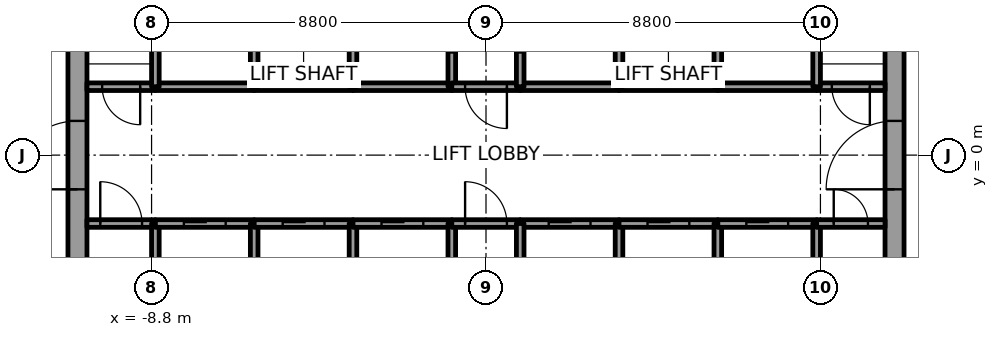
"""IFC4 building model, lengths in metres.
Left out: names, types, materials, properties, quantities, classifications, styles, units other than length and angle.
Written with IfcOpenShell. Run it as: python <this file> out.ifc"""

import sys

from ifc_helpers import new_model, si_unit, direction, frame, frame_2d, origin, place, context, subcontext, project, spatial, rectangle, extrude, element, fill, save


model = new_model("IFC4")
c1 = context("Model", 3, precision=1e-05, world=origin(), true_north=direction((0.0, 1.0)))
c2 = subcontext(c1, "Body", "Model", "MODEL_VIEW")
j1 = project(units=[si_unit("LENGTHUNIT", "METRE"), si_unit("PLANEANGLEUNIT", "RADIAN")], contexts=[c1])
p1 = place(None, origin())
s1 = spatial("IfcSite", under=j1, at=p1, CompositionType="ELEMENT")
p2 = place(p1, origin())
s2 = spatial("IfcBuilding", under=s1, at=p2, CompositionType="ELEMENT")
p3 = place(p2, frame((0.0, 0.0, 149.8)))
s3 = spatial("IfcBuildingStorey", under=s2, at=p3, CompositionType="ELEMENT", Elevation=149.8)
p4 = place(p3, frame((-10.75, -7.5, 0.0), z_axis=(0.0, 0.0, 1.0), x_axis=(0.0, 1.0, 0.0)))
e1 = element("IfcWall", 1, at=p4, inside=s3, PredefinedType="SHEAR", context=c2, shape_type="SweptSolid", body=[
    extrude(rectangle(XDim=15.0, YDim=0.5, at=frame_2d((7.5, 0.0))), origin(), (0.0, 0.0, 1.0), 4.0),
])
p5 = place(p4, frame((6.6, 0.0, 0.0)))
e2 = element("IfcOpeningElement", 2, at=p5, cuts=e1, PredefinedType="OPENING", context=c2, shape_type="SweptSolid", body=[
    extrude(rectangle(XDim=1.8, YDim=2.1, at=frame_2d((0.9, 1.05))), frame((0.0, 0.25, 0.0), z_axis=(0.0, -1.0, 0.0), x_axis=(1.0, 0.0, 0.0)), (0.0, 0.0, 1.0), 0.5),
])
p6 = place(p3, frame((10.75, -7.5, 0.0), z_axis=(0.0, 0.0, 1.0), x_axis=(0.0, 1.0, 0.0)))
e3 = element("IfcWall", 3, at=p6, inside=s3, PredefinedType="SHEAR", context=c2, shape_type="SweptSolid", body=[
    extrude(rectangle(XDim=15.0, YDim=0.5, at=frame_2d((7.5, 0.0))), origin(), (0.0, 0.0, 1.0), 4.0),
])
p7 = place(p6, frame((6.6, 0.0, 0.0)))
e4 = element("IfcOpeningElement", 4, at=p7, cuts=e3, PredefinedType="OPENING", context=c2, shape_type="SweptSolid", body=[
    extrude(rectangle(XDim=1.8, YDim=2.1, at=frame_2d((0.9, 1.05))), frame((0.0, 0.25, 0.0), z_axis=(0.0, -1.0, 0.0), x_axis=(1.0, 0.0, 0.0)), (0.0, 0.0, 1.0), 0.5),
])
p8 = place(p3, frame((-10.5, -1.8, 0.0), z_axis=(0.0, 0.0, 1.0), x_axis=(1.0, 0.0, 0.0)))
e5 = element("IfcWall", 5, at=p8, inside=s3, PredefinedType="SOLIDWALL", context=c2, shape_type="SweptSolid", body=[
    extrude(rectangle(XDim=1.8, YDim=0.2, at=frame_2d((0.9, 0.0))), origin(), (0.0, 0.0, 1.0), 3.85),
])
p9 = place(p8, frame((0.35, 0.0, 0.0)))
e6 = element("IfcOpeningElement", 6, at=p9, cuts=e5, PredefinedType="OPENING", context=c2, shape_type="SweptSolid", body=[
    extrude(rectangle(XDim=1.1, YDim=2.1, at=frame_2d((0.55, 1.05))), frame((0.0, 0.1, 0.0), z_axis=(0.0, -1.0, 0.0), x_axis=(1.0, 0.0, 0.0)), (0.0, 0.0, 1.0), 0.2),
])
p10 = place(p3, frame((-8.7, 1.8, 0.0), z_axis=(0.0, 0.0, 1.0), x_axis=(-1.0, 0.0, 0.0)))
e7 = element("IfcWall", 7, at=p10, inside=s3, PredefinedType="SOLIDWALL", context=c2, shape_type="SweptSolid", body=[
    extrude(rectangle(XDim=1.8, YDim=0.2, at=frame_2d((0.9, 0.0))), origin(), (0.0, 0.0, 1.0), 3.85),
])
p11 = place(p10, frame((0.4, 0.0, 0.0)))
e8 = element("IfcOpeningElement", 8, at=p11, cuts=e7, PredefinedType="OPENING", context=c2, shape_type="SweptSolid", body=[
    extrude(rectangle(XDim=1.0, YDim=2.1, at=frame_2d((0.5, 1.05))), frame((0.0, 0.1, 0.0), z_axis=(0.0, -1.0, 0.0), x_axis=(1.0, 0.0, 0.0)), (0.0, 0.0, 1.0), 0.2),
])
p12 = place(p3, frame((-8.7, -4.6, 0.0), z_axis=(0.0, 0.0, 1.0), x_axis=(0.0, 1.0, 0.0)))
e9 = element("IfcWall", 9, at=p12, inside=s3, PredefinedType="SOLIDWALL", context=c2, shape_type="SweptSolid", body=[
    extrude(rectangle(XDim=2.8, YDim=0.2, at=frame_2d((1.4, 0.0))), origin(), (0.0, 0.0, 1.0), 3.85),
])
p13 = place(p3, frame((-8.7, -1.8, 0.0), z_axis=(0.0, 0.0, 1.0), x_axis=(1.0, 0.0, 0.0)))
e10 = element("IfcWall", 10, at=p13, inside=s3, PredefinedType="SOLIDWALL", context=c2, shape_type="SweptSolid", body=[
    extrude(rectangle(XDim=2.6, YDim=0.2, at=frame_2d((1.3, 0.0))), origin(), (0.0, 0.0, 1.0), 3.85),
])
p14 = place(p13, frame((0.75, 0.0, 0.0)))
e11 = element("IfcOpeningElement", 11, at=p14, cuts=e10, PredefinedType="OPENING", context=c2, shape_type="SweptSolid", body=[
    extrude(rectangle(XDim=1.1, YDim=2.1, at=frame_2d((0.55, 1.05))), frame((0.0, 0.1, 0.0), z_axis=(0.0, -1.0, 0.0), x_axis=(1.0, 0.0, 0.0)), (0.0, 0.0, 1.0), 0.2),
])
p15 = place(p3, frame((-6.1, 1.8, 0.0), z_axis=(0.0, 0.0, 1.0), x_axis=(-1.0, 0.0, 0.0)))
e12 = element("IfcWall", 12, at=p15, inside=s3, PredefinedType="SOLIDWALL", context=c2, shape_type="SweptSolid", body=[
    extrude(rectangle(XDim=2.6, YDim=0.2, at=frame_2d((1.3, 0.0))), origin(), (0.0, 0.0, 1.0), 3.85),
])
for number, where, z_axis, x_axis in (
    (13, (-8.7, 1.8, 0.0), (0.0, 0.0, 1.0), (0.0, 1.0, 0.0)),
    (14, (-6.1, -4.6, 0.0), (0.0, 0.0, 1.0), (0.0, 1.0, 0.0)),
):
    element("IfcWall", number, at=place(p3, frame(where, z_axis=z_axis, x_axis=x_axis)), inside=s3, PredefinedType="SOLIDWALL", context=c2, shape_type="SweptSolid", body=[
        extrude(rectangle(XDim=2.8, YDim=0.2, at=frame_2d((1.4, 0.0))), origin(), (0.0, 0.0, 1.0), 3.85),
    ])
p16 = place(p3, frame((-6.1, -1.8, 0.0), z_axis=(0.0, 0.0, 1.0), x_axis=(1.0, 0.0, 0.0)))
e15 = element("IfcWall", 15, at=p16, inside=s3, PredefinedType="SOLIDWALL", context=c2, shape_type="SweptSolid", body=[
    extrude(rectangle(XDim=2.6, YDim=0.2, at=frame_2d((1.3, 0.0))), origin(), (0.0, 0.0, 1.0), 3.85),
])
p17 = place(p16, frame((0.75, 0.0, 0.0)))
e16 = element("IfcOpeningElement", 16, at=p17, cuts=e15, PredefinedType="OPENING", context=c2, shape_type="SweptSolid", body=[
    extrude(rectangle(XDim=1.1, YDim=2.1, at=frame_2d((0.55, 1.05))), frame((0.0, 0.1, 0.0), z_axis=(0.0, -1.0, 0.0), x_axis=(1.0, 0.0, 0.0)), (0.0, 0.0, 1.0), 0.2),
])
p18 = place(p3, frame((-3.5, 1.8, 0.0), z_axis=(0.0, 0.0, 1.0), x_axis=(-1.0, 0.0, 0.0)))
e17 = element("IfcWall", 17, at=p18, inside=s3, PredefinedType="SOLIDWALL", context=c2, shape_type="SweptSolid", body=[
    extrude(rectangle(XDim=2.6, YDim=0.2, at=frame_2d((1.3, 0.0))), origin(), (0.0, 0.0, 1.0), 3.85),
])
for number, where, z_axis, x_axis in (
    (18, (-6.1, 1.8, 0.0), (0.0, 0.0, 1.0), (0.0, 1.0, 0.0)),
    (19, (-3.5, -4.6, 0.0), (0.0, 0.0, 1.0), (0.0, 1.0, 0.0)),
):
    element("IfcWall", number, at=place(p3, frame(where, z_axis=z_axis, x_axis=x_axis)), inside=s3, PredefinedType="SOLIDWALL", context=c2, shape_type="SweptSolid", body=[
        extrude(rectangle(XDim=2.8, YDim=0.2, at=frame_2d((1.4, 0.0))), origin(), (0.0, 0.0, 1.0), 3.85),
    ])
p19 = place(p3, frame((-3.5, -1.8, 0.0), z_axis=(0.0, 0.0, 1.0), x_axis=(1.0, 0.0, 0.0)))
e20 = element("IfcWall", 20, at=p19, inside=s3, PredefinedType="SOLIDWALL", context=c2, shape_type="SweptSolid", body=[
    extrude(rectangle(XDim=2.6, YDim=0.2, at=frame_2d((1.3, 0.0))), origin(), (0.0, 0.0, 1.0), 3.85),
])
p20 = place(p19, frame((0.75, 0.0, 0.0)))
e21 = element("IfcOpeningElement", 21, at=p20, cuts=e20, PredefinedType="OPENING", context=c2, shape_type="SweptSolid", body=[
    extrude(rectangle(XDim=1.1, YDim=2.1, at=frame_2d((0.55, 1.05))), frame((0.0, 0.1, 0.0), z_axis=(0.0, -1.0, 0.0), x_axis=(1.0, 0.0, 0.0)), (0.0, 0.0, 1.0), 0.2),
])
p21 = place(p3, frame((-0.9, 1.8, 0.0), z_axis=(0.0, 0.0, 1.0), x_axis=(-1.0, 0.0, 0.0)))
e22 = element("IfcWall", 22, at=p21, inside=s3, PredefinedType="SOLIDWALL", context=c2, shape_type="SweptSolid", body=[
    extrude(rectangle(XDim=2.6, YDim=0.2, at=frame_2d((1.3, 0.0))), origin(), (0.0, 0.0, 1.0), 3.85),
])
p22 = place(p3, frame((-3.5, 4.6, 0.0), z_axis=(0.0, 0.0, 1.0), x_axis=(0.0, -1.0, 0.0)))
e23 = element("IfcWall", 23, at=p22, inside=s3, PredefinedType="SOLIDWALL", context=c2, shape_type="SweptSolid", body=[
    extrude(rectangle(XDim=2.8, YDim=0.2, at=frame_2d((1.4, 0.0))), origin(), (0.0, 0.0, 1.0), 3.85),
])
p23 = place(p3, frame((-0.9, 1.8, 0.0), z_axis=(0.0, 0.0, 1.0), x_axis=(0.0, 1.0, 0.0)))
e24 = element("IfcWall", 24, at=p23, inside=s3, PredefinedType="SOLIDWALL", context=c2, shape_type="SweptSolid", body=[
    extrude(rectangle(XDim=3.0, YDim=0.2, at=frame_2d((1.5, 0.0))), origin(), (0.0, 0.0, 1.0), 3.85),
])
p24 = place(p23, frame((0.9, 0.0, 0.0)))
e25 = element("IfcOpeningElement", 25, at=p24, cuts=e24, PredefinedType="OPENING", context=c2, shape_type="SweptSolid", body=[
    extrude(rectangle(XDim=1.2, YDim=2.1, at=frame_2d((0.6, 1.05))), frame((0.0, 0.1, 0.0), z_axis=(0.0, -1.0, 0.0), x_axis=(1.0, 0.0, 0.0)), (0.0, 0.0, 1.0), 0.2),
])
p25 = place(p3, frame((-0.9, -4.6, 0.0), z_axis=(0.0, 0.0, 1.0), x_axis=(0.0, 1.0, 0.0)))
e26 = element("IfcWall", 26, at=p25, inside=s3, PredefinedType="SOLIDWALL", context=c2, shape_type="SweptSolid", body=[
    extrude(rectangle(XDim=2.8, YDim=0.2, at=frame_2d((1.4, 0.0))), origin(), (0.0, 0.0, 1.0), 3.85),
])
p26 = place(p3, frame((-0.9, -1.8, 0.0), z_axis=(0.0, 0.0, 1.0), x_axis=(1.0, 0.0, 0.0)))
e27 = element("IfcWall", 27, at=p26, inside=s3, PredefinedType="SOLIDWALL", context=c2, shape_type="SweptSolid", body=[
    extrude(rectangle(XDim=1.8, YDim=0.2, at=frame_2d((0.9, 0.0))), origin(), (0.0, 0.0, 1.0), 3.85),
])
p27 = place(p26, frame((0.35, 0.0, 0.0)))
e28 = element("IfcOpeningElement", 28, at=p27, cuts=e27, PredefinedType="OPENING", context=c2, shape_type="SweptSolid", body=[
    extrude(rectangle(XDim=1.1, YDim=2.1, at=frame_2d((0.55, 1.05))), frame((0.0, 0.1, 0.0), z_axis=(0.0, -1.0, 0.0), x_axis=(1.0, 0.0, 0.0)), (0.0, 0.0, 1.0), 0.2),
])
p28 = place(p3, frame((0.9, 1.8, 0.0), z_axis=(0.0, 0.0, 1.0), x_axis=(-1.0, 0.0, 0.0)))
e29 = element("IfcWall", 29, at=p28, inside=s3, PredefinedType="SOLIDWALL", context=c2, shape_type="SweptSolid", body=[
    extrude(rectangle(XDim=1.8, YDim=0.2, at=frame_2d((0.9, 0.0))), origin(), (0.0, 0.0, 1.0), 3.85),
])
p29 = place(p28, frame((0.35, 0.0, 0.0)))
e30 = element("IfcOpeningElement", 30, at=p29, cuts=e29, PredefinedType="OPENING", context=c2, shape_type="SweptSolid", body=[
    extrude(rectangle(XDim=1.1, YDim=2.1, at=frame_2d((0.55, 1.05))), frame((0.0, 0.1, 0.0), z_axis=(0.0, -1.0, 0.0), x_axis=(1.0, 0.0, 0.0)), (0.0, 0.0, 1.0), 0.2),
])
p30 = place(p3, frame((0.9, -1.8, 0.0), z_axis=(0.0, 0.0, 1.0), x_axis=(1.0, 0.0, 0.0)))
e31 = element("IfcWall", 31, at=p30, inside=s3, PredefinedType="SOLIDWALL", context=c2, shape_type="SweptSolid", body=[
    extrude(rectangle(XDim=2.6, YDim=0.2, at=frame_2d((1.3, 0.0))), origin(), (0.0, 0.0, 1.0), 3.85),
])
p31 = place(p30, frame((0.75, 0.0, 0.0)))
e32 = element("IfcOpeningElement", 32, at=p31, cuts=e31, PredefinedType="OPENING", context=c2, shape_type="SweptSolid", body=[
    extrude(rectangle(XDim=1.1, YDim=2.1, at=frame_2d((0.55, 1.05))), frame((0.0, 0.1, 0.0), z_axis=(0.0, -1.0, 0.0), x_axis=(1.0, 0.0, 0.0)), (0.0, 0.0, 1.0), 0.2),
])
p32 = place(p3, frame((0.9, -1.8, 0.0), z_axis=(0.0, 0.0, 1.0), x_axis=(0.0, -1.0, 0.0)))
e33 = element("IfcWall", 33, at=p32, inside=s3, PredefinedType="SOLIDWALL", context=c2, shape_type="SweptSolid", body=[
    extrude(rectangle(XDim=2.8, YDim=0.2, at=frame_2d((1.4, 0.0))), origin(), (0.0, 0.0, 1.0), 3.85),
])
p33 = place(p3, frame((3.5, 1.8, 0.0), z_axis=(0.0, 0.0, 1.0), x_axis=(-1.0, 0.0, 0.0)))
e34 = element("IfcWall", 34, at=p33, inside=s3, PredefinedType="SOLIDWALL", context=c2, shape_type="SweptSolid", body=[
    extrude(rectangle(XDim=2.6, YDim=0.2, at=frame_2d((1.3, 0.0))), origin(), (0.0, 0.0, 1.0), 3.85),
])
p34 = place(p3, frame((0.9, 4.8, 0.0), z_axis=(0.0, 0.0, 1.0), x_axis=(0.0, -1.0, 0.0)))
e35 = element("IfcWall", 35, at=p34, inside=s3, PredefinedType="SOLIDWALL", context=c2, shape_type="SweptSolid", body=[
    extrude(rectangle(XDim=3.0, YDim=0.2, at=frame_2d((1.5, 0.0))), origin(), (0.0, 0.0, 1.0), 3.85),
])
p35 = place(p34, frame((0.9, 0.0, 0.0)))
e36 = element("IfcOpeningElement", 36, at=p35, cuts=e35, PredefinedType="OPENING", context=c2, shape_type="SweptSolid", body=[
    extrude(rectangle(XDim=1.2, YDim=2.1, at=frame_2d((0.6, 1.05))), frame((0.0, 0.1, 0.0), z_axis=(0.0, -1.0, 0.0), x_axis=(1.0, 0.0, 0.0)), (0.0, 0.0, 1.0), 0.2),
])
p36 = place(p3, frame((3.5, -4.6, 0.0), z_axis=(0.0, 0.0, 1.0), x_axis=(0.0, 1.0, 0.0)))
e37 = element("IfcWall", 37, at=p36, inside=s3, PredefinedType="SOLIDWALL", context=c2, shape_type="SweptSolid", body=[
    extrude(rectangle(XDim=2.8, YDim=0.2, at=frame_2d((1.4, 0.0))), origin(), (0.0, 0.0, 1.0), 3.85),
])
p37 = place(p3, frame((3.5, -1.8, 0.0), z_axis=(0.0, 0.0, 1.0), x_axis=(1.0, 0.0, 0.0)))
e38 = element("IfcWall", 38, at=p37, inside=s3, PredefinedType="SOLIDWALL", context=c2, shape_type="SweptSolid", body=[
    extrude(rectangle(XDim=2.6, YDim=0.2, at=frame_2d((1.3, 0.0))), origin(), (0.0, 0.0, 1.0), 3.85),
])
p38 = place(p37, frame((0.75, 0.0, 0.0)))
e39 = element("IfcOpeningElement", 39, at=p38, cuts=e38, PredefinedType="OPENING", context=c2, shape_type="SweptSolid", body=[
    extrude(rectangle(XDim=1.1, YDim=2.1, at=frame_2d((0.55, 1.05))), frame((0.0, 0.1, 0.0), z_axis=(0.0, -1.0, 0.0), x_axis=(1.0, 0.0, 0.0)), (0.0, 0.0, 1.0), 0.2),
])
p39 = place(p3, frame((6.1, 1.8, 0.0), z_axis=(0.0, 0.0, 1.0), x_axis=(-1.0, 0.0, 0.0)))
e40 = element("IfcWall", 40, at=p39, inside=s3, PredefinedType="SOLIDWALL", context=c2, shape_type="SweptSolid", body=[
    extrude(rectangle(XDim=2.6, YDim=0.2, at=frame_2d((1.3, 0.0))), origin(), (0.0, 0.0, 1.0), 3.85),
])
for number, where, z_axis, x_axis in (
    (41, (3.5, 1.8, 0.0), (0.0, 0.0, 1.0), (0.0, 1.0, 0.0)),
    (42, (6.1, -4.6, 0.0), (0.0, 0.0, 1.0), (0.0, 1.0, 0.0)),
):
    element("IfcWall", number, at=place(p3, frame(where, z_axis=z_axis, x_axis=x_axis)), inside=s3, PredefinedType="SOLIDWALL", context=c2, shape_type="SweptSolid", body=[
        extrude(rectangle(XDim=2.8, YDim=0.2, at=frame_2d((1.4, 0.0))), origin(), (0.0, 0.0, 1.0), 3.85),
    ])
p40 = place(p3, frame((6.1, -1.8, 0.0), z_axis=(0.0, 0.0, 1.0), x_axis=(1.0, 0.0, 0.0)))
e43 = element("IfcWall", 43, at=p40, inside=s3, PredefinedType="SOLIDWALL", context=c2, shape_type="SweptSolid", body=[
    extrude(rectangle(XDim=2.6, YDim=0.2, at=frame_2d((1.3, 0.0))), origin(), (0.0, 0.0, 1.0), 3.85),
])
p41 = place(p40, frame((0.75, 0.0, 0.0)))
e44 = element("IfcOpeningElement", 44, at=p41, cuts=e43, PredefinedType="OPENING", context=c2, shape_type="SweptSolid", body=[
    extrude(rectangle(XDim=1.1, YDim=2.1, at=frame_2d((0.55, 1.05))), frame((0.0, 0.1, 0.0), z_axis=(0.0, -1.0, 0.0), x_axis=(1.0, 0.0, 0.0)), (0.0, 0.0, 1.0), 0.2),
])
p42 = place(p3, frame((8.7, 1.8, 0.0), z_axis=(0.0, 0.0, 1.0), x_axis=(-1.0, 0.0, 0.0)))
e45 = element("IfcWall", 45, at=p42, inside=s3, PredefinedType="SOLIDWALL", context=c2, shape_type="SweptSolid", body=[
    extrude(rectangle(XDim=2.6, YDim=0.2, at=frame_2d((1.3, 0.0))), origin(), (0.0, 0.0, 1.0), 3.85),
])
for number, where, z_axis, x_axis in (
    (46, (6.1, 1.8, 0.0), (0.0, 0.0, 1.0), (0.0, 1.0, 0.0)),
    (47, (8.7, -1.8, 0.0), (0.0, 0.0, 1.0), (0.0, -1.0, 0.0)),
):
    element("IfcWall", number, at=place(p3, frame(where, z_axis=z_axis, x_axis=x_axis)), inside=s3, PredefinedType="SOLIDWALL", context=c2, shape_type="SweptSolid", body=[
        extrude(rectangle(XDim=2.8, YDim=0.2, at=frame_2d((1.4, 0.0))), origin(), (0.0, 0.0, 1.0), 3.85),
    ])
p43 = place(p3, frame((8.7, -1.8, 0.0), z_axis=(0.0, 0.0, 1.0), x_axis=(1.0, 0.0, 0.0)))
e48 = element("IfcWall", 48, at=p43, inside=s3, PredefinedType="SOLIDWALL", context=c2, shape_type="SweptSolid", body=[
    extrude(rectangle(XDim=1.8, YDim=0.2, at=frame_2d((0.9, 0.0))), origin(), (0.0, 0.0, 1.0), 3.85),
])
p44 = place(p43, frame((0.45, 0.0, 0.0)))
e49 = element("IfcOpeningElement", 49, at=p44, cuts=e48, PredefinedType="OPENING", context=c2, shape_type="SweptSolid", body=[
    extrude(rectangle(XDim=0.9, YDim=2.1, at=frame_2d((0.45, 1.05))), frame((0.0, 0.1, 0.0), z_axis=(0.0, -1.0, 0.0), x_axis=(1.0, 0.0, 0.0)), (0.0, 0.0, 1.0), 0.2),
])
p45 = place(p3, frame((10.5, 1.8, 0.0), z_axis=(0.0, 0.0, 1.0), x_axis=(-1.0, 0.0, 0.0)))
e50 = element("IfcWall", 50, at=p45, inside=s3, PredefinedType="SOLIDWALL", context=c2, shape_type="SweptSolid", body=[
    extrude(rectangle(XDim=1.8, YDim=0.2, at=frame_2d((0.9, 0.0))), origin(), (0.0, 0.0, 1.0), 3.85),
])
p46 = place(p45, frame((0.4, 0.0, 0.0)))
e51 = element("IfcOpeningElement", 51, at=p46, cuts=e50, PredefinedType="OPENING", context=c2, shape_type="SweptSolid", body=[
    extrude(rectangle(XDim=1.0, YDim=2.1, at=frame_2d((0.5, 1.05))), frame((0.0, 0.1, 0.0), z_axis=(0.0, -1.0, 0.0), x_axis=(1.0, 0.0, 0.0)), (0.0, 0.0, 1.0), 0.2),
])
p47 = place(p3, frame((8.7, 4.6, 0.0), z_axis=(0.0, 0.0, 1.0), x_axis=(0.0, -1.0, 0.0)))
e52 = element("IfcWall", 52, at=p47, inside=s3, PredefinedType="SOLIDWALL", context=c2, shape_type="SweptSolid", body=[
    extrude(rectangle(XDim=2.8, YDim=0.2, at=frame_2d((1.4, 0.0))), origin(), (0.0, 0.0, 1.0), 3.85),
])
p48 = place(p14, origin())
e53 = element("IfcDoor", 53, at=p48, inside=s3, OperationType="SLIDING_TO_RIGHT", PredefinedType="DOOR", context=c2, shape_type="SweptSolid", body=[
    extrude(rectangle(XDim=1.1, YDim=2.1, at=frame_2d((0.55, 1.05))), frame((0.0, 0.025, 0.0), z_axis=(0.0, -1.0, 0.0), x_axis=(1.0, 0.0, 0.0)), (0.0, 0.0, 1.0), 0.05),
])
fill(e11, e53)
p49 = place(p17, origin())
e54 = element("IfcDoor", 54, at=p49, inside=s3, OperationType="SLIDING_TO_LEFT", PredefinedType="DOOR", context=c2, shape_type="SweptSolid", body=[
    extrude(rectangle(XDim=1.1, YDim=2.1, at=frame_2d((0.55, 1.05))), frame((0.0, 0.025, 0.0), z_axis=(0.0, -1.0, 0.0), x_axis=(1.0, 0.0, 0.0)), (0.0, 0.0, 1.0), 0.05),
])
fill(e16, e54)
p50 = place(p20, origin())
e55 = element("IfcDoor", 55, at=p50, inside=s3, OperationType="SLIDING_TO_LEFT", PredefinedType="DOOR", context=c2, shape_type="SweptSolid", body=[
    extrude(rectangle(XDim=1.1, YDim=2.1, at=frame_2d((0.55, 1.05))), frame((0.0, 0.025, 0.0), z_axis=(0.0, -1.0, 0.0), x_axis=(1.0, 0.0, 0.0)), (0.0, 0.0, 1.0), 0.05),
])
fill(e21, e55)
p51 = place(p31, origin())
e56 = element("IfcDoor", 56, at=p51, inside=s3, OperationType="SLIDING_TO_LEFT", PredefinedType="DOOR", context=c2, shape_type="SweptSolid", body=[
    extrude(rectangle(XDim=1.1, YDim=2.1, at=frame_2d((0.55, 1.05))), frame((0.0, 0.025, 0.0), z_axis=(0.0, -1.0, 0.0), x_axis=(1.0, 0.0, 0.0)), (0.0, 0.0, 1.0), 0.05),
])
fill(e32, e56)
p52 = place(p38, origin())
e57 = element("IfcDoor", 57, at=p52, inside=s3, OperationType="SLIDING_TO_RIGHT", PredefinedType="DOOR", context=c2, shape_type="SweptSolid", body=[
    extrude(rectangle(XDim=1.1, YDim=2.1, at=frame_2d((0.55, 1.05))), frame((0.0, 0.025, 0.0), z_axis=(0.0, -1.0, 0.0), x_axis=(1.0, 0.0, 0.0)), (0.0, 0.0, 1.0), 0.05),
])
fill(e39, e57)
p53 = place(p41, origin())
e58 = element("IfcDoor", 58, at=p53, inside=s3, OperationType="SLIDING_TO_RIGHT", PredefinedType="DOOR", context=c2, shape_type="SweptSolid", body=[
    extrude(rectangle(XDim=1.1, YDim=2.1, at=frame_2d((0.55, 1.05))), frame((0.0, 0.025, 0.0), z_axis=(0.0, -1.0, 0.0), x_axis=(1.0, 0.0, 0.0)), (0.0, 0.0, 1.0), 0.05),
])
fill(e44, e58)
p54 = place(p9, origin())
e59 = element("IfcDoor", 59, at=p54, inside=s3, OperationType="SINGLE_SWING_RIGHT", PredefinedType="DOOR", context=c2, shape_type="SweptSolid", body=[
    extrude(rectangle(XDim=1.1, YDim=2.1, at=frame_2d((0.55, 1.05))), frame((0.0, 0.025, 0.0), z_axis=(0.0, -1.0, 0.0), x_axis=(1.0, 0.0, 0.0)), (0.0, 0.0, 1.0), 0.05),
])
fill(e6, e59)
p55 = place(p29, origin())
e60 = element("IfcDoor", 60, at=p55, inside=s3, OperationType="SINGLE_SWING_LEFT", PredefinedType="DOOR", context=c2, shape_type="SweptSolid", body=[
    extrude(rectangle(XDim=1.1, YDim=2.1, at=frame_2d((0.55, 1.05))), frame((0.0, 0.025, 0.0), z_axis=(0.0, -1.0, 0.0), x_axis=(1.0, 0.0, 0.0)), (0.0, 0.0, 1.0), 0.05),
])
fill(e30, e60)
p56 = place(p27, origin())
e61 = element("IfcDoor", 61, at=p56, inside=s3, OperationType="SINGLE_SWING_LEFT", PredefinedType="DOOR", context=c2, shape_type="SweptSolid", body=[
    extrude(rectangle(XDim=1.1, YDim=2.1, at=frame_2d((0.55, 1.05))), frame((0.0, 0.025, 0.0), z_axis=(0.0, -1.0, 0.0), x_axis=(1.0, 0.0, 0.0)), (0.0, 0.0, 1.0), 0.05),
])
fill(e28, e61)
p57 = place(p11, origin())
e62 = element("IfcDoor", 62, at=p57, inside=s3, OperationType="SINGLE_SWING_RIGHT", PredefinedType="DOOR", context=c2, shape_type="SweptSolid", body=[
    extrude(rectangle(XDim=1.0, YDim=2.1, at=frame_2d((0.5, 1.05))), frame((0.0, 0.025, 0.0), z_axis=(0.0, -1.0, 0.0), x_axis=(1.0, 0.0, 0.0)), (0.0, 0.0, 1.0), 0.05),
])
fill(e8, e62)
p58 = place(p46, origin())
e63 = element("IfcDoor", 63, at=p58, inside=s3, OperationType="SINGLE_SWING_LEFT", PredefinedType="DOOR", context=c2, shape_type="SweptSolid", body=[
    extrude(rectangle(XDim=1.0, YDim=2.1, at=frame_2d((0.5, 1.05))), frame((0.0, 0.025, 0.0), z_axis=(0.0, -1.0, 0.0), x_axis=(1.0, 0.0, 0.0)), (0.0, 0.0, 1.0), 0.05),
])
fill(e51, e63)
p59 = place(p44, origin())
e64 = element("IfcDoor", 64, at=p59, inside=s3, OperationType="SINGLE_SWING_LEFT", PredefinedType="DOOR", context=c2, shape_type="SweptSolid", body=[
    extrude(rectangle(XDim=0.9, YDim=2.1, at=frame_2d((0.45, 1.05))), frame((0.0, 0.025, 0.0), z_axis=(0.0, -1.0, 0.0), x_axis=(1.0, 0.0, 0.0)), (0.0, 0.0, 1.0), 0.05),
])
fill(e49, e64)
p60 = place(p5, origin())
e65 = element("IfcDoor", 65, at=p60, inside=s3, OperationType="DOUBLE_DOOR_SINGLE_SWING", PredefinedType="DOOR", context=c2, shape_type="SweptSolid", body=[
    extrude(rectangle(XDim=1.8, YDim=2.1, at=frame_2d((0.9, 1.05))), frame((0.0, 0.025, 0.0), z_axis=(0.0, -1.0, 0.0), x_axis=(1.0, 0.0, 0.0)), (0.0, 0.0, 1.0), 0.05),
])
fill(e2, e65)
p61 = place(p7, origin())
e66 = element("IfcDoor", 66, at=p61, inside=s3, OperationType="DOUBLE_DOOR_SINGLE_SWING", PredefinedType="DOOR", context=c2, shape_type="SweptSolid", body=[
    extrude(rectangle(XDim=1.8, YDim=2.1, at=frame_2d((0.9, 1.05))), frame((0.0, 0.025, 0.0), z_axis=(0.0, -1.0, 0.0), x_axis=(1.0, 0.0, 0.0)), (0.0, 0.0, 1.0), 0.05),
])
fill(e4, e66)
save(model, sys.argv[1])
